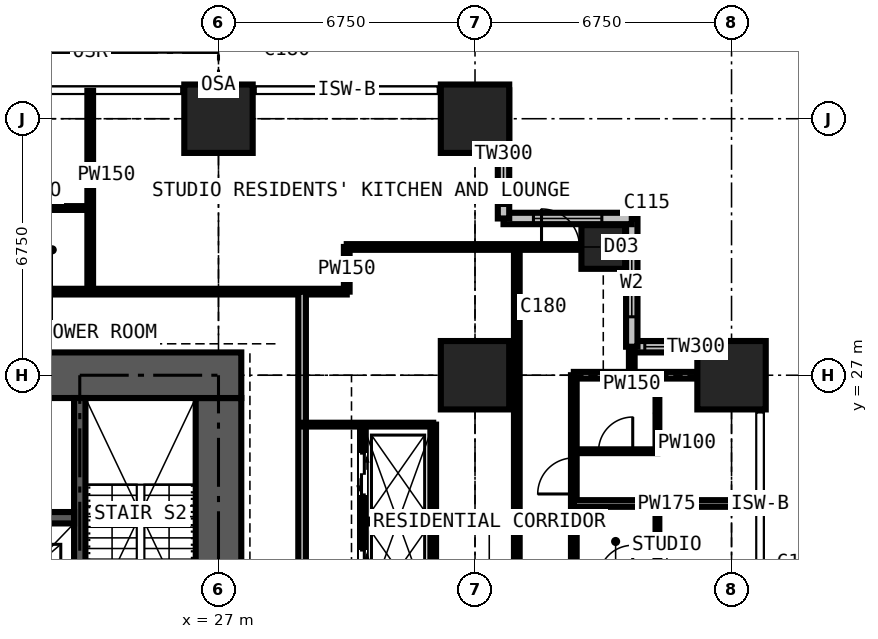
"""IFC4 building model, lengths in metres.
Left out: names, types, materials, properties, quantities, classifications, styles, units other than length and angle.
Written with IfcOpenShell. Run it as: python <this file> out.ifc"""

import sys

from ifc_helpers import new_model, si_unit, direction, frame, frame_2d, origin, origin_2d, place, context, subcontext, project, spatial, rectangle, extrude, element, fill, save


model = new_model("IFC4")
c1 = context("Model", 3, precision=1e-05, world=origin(), true_north=direction((0.0, 1.0)))
c2 = subcontext(c1, "Body", "Model", "MODEL_VIEW")
j1 = project(units=[si_unit("LENGTHUNIT", "METRE"), si_unit("PLANEANGLEUNIT", "RADIAN")], contexts=[c1])
p1 = place(None, origin())
s1 = spatial("IfcSite", under=j1, at=p1, CompositionType="ELEMENT")
p2 = place(p1, origin())
s2 = spatial("IfcBuilding", under=s1, at=p2, CompositionType="ELEMENT")
p3 = place(p2, frame((0.0, 0.0, 94.5)))
s3 = spatial("IfcBuildingStorey", under=s2, at=p3, CompositionType="ELEMENT", Elevation=94.5)
for number, where, z_axis, x_axis in (
    (1, (27.0, 33.75, 0.0), (0.0, 0.0, 1.0), (1.0, 0.0, 0.0)),
    (2, (33.75, 27.0, 0.0), (0.0, 0.0, 1.0), (1.0, 0.0, 0.0)),
    (3, (33.75, 33.75, 0.0), (0.0, 0.0, 1.0), (1.0, 0.0, 0.0)),
):
    element("IfcColumn", number, at=place(p3, frame(where, z_axis=z_axis, x_axis=x_axis)), inside=s3, PredefinedType="COLUMN", context=c2, shape_type="SweptSolid", body=[
        extrude(rectangle(XDim=1.8, YDim=1.8, at=origin_2d()), origin(), (0.0, 0.0, 1.0), 3.6),
    ])
p4 = place(p3, frame((37.125, 30.375, 0.0), z_axis=(0.0, 0.0, 1.0), x_axis=(1.0, 0.0, 0.0)))
e4 = element("IfcColumn", 4, at=p4, inside=s3, PredefinedType="COLUMN", context=c2, shape_type="SweptSolid", body=[
    extrude(rectangle(XDim=1.15, YDim=1.15, at=origin_2d()), origin(), (0.0, 0.0, 1.0), 3.6),
])
p5 = place(p3, frame((40.5, 27.0, 0.0), z_axis=(0.0, 0.0, 1.0), x_axis=(1.0, 0.0, 0.0)))
e5 = element("IfcColumn", 5, at=p5, inside=s3, PredefinedType="COLUMN", context=c2, shape_type="SweptSolid", body=[
    extrude(rectangle(XDim=1.8, YDim=1.8, at=origin_2d()), origin(), (0.0, 0.0, 1.0), 3.6),
])
p6 = place(p3, frame((27.0, 14.1, 0.0), z_axis=(0.0, 0.0, 1.0), x_axis=(0.0, 1.0, 0.0)))
e6 = element("IfcWall", 6, at=p6, inside=s3, PredefinedType="SHEAR", context=c2, shape_type="SweptSolid", body=[
    extrude(rectangle(XDim=12.3, YDim=1.2, at=frame_2d((6.15, 0.0))), origin(), (0.0, 0.0, 1.0), 3.6),
])
p7 = place(p6, frame((3.65, 0.0, 0.0)))
e7 = element("IfcOpeningElement", 7, at=p7, cuts=e6, PredefinedType="OPENING", context=c2, shape_type="SweptSolid", body=[
    extrude(rectangle(XDim=1.2, YDim=2.2, at=frame_2d((0.6, 1.1))), frame((0.0, 0.61, 0.0), z_axis=(0.0, -1.0, 0.0), x_axis=(1.0, 0.0, 0.0)), (0.0, 0.0, 1.0), 1.22),
])
p8 = place(p3, frame((27.6, 27.0, 0.0), z_axis=(0.0, 0.0, 1.0), x_axis=(-1.0, 0.0, 0.0)))
e8 = element("IfcWall", 8, at=p8, inside=s3, PredefinedType="SHEAR", context=c2, shape_type="SweptSolid", body=[
    extrude(rectangle(XDim=14.7, YDim=1.2, at=frame_2d((7.35, 0.0))), origin(), (0.0, 0.0, 1.0), 3.6),
])
p9 = place(p8, frame((5.225, 0.0, 0.0)))
e9 = element("IfcOpeningElement", 9, at=p9, cuts=e8, PredefinedType="OPENING", context=c2, shape_type="SweptSolid", body=[
    extrude(rectangle(XDim=0.9, YDim=2.2, at=frame_2d((0.45, 1.1))), frame((0.0, 0.61, 0.0), z_axis=(0.0, -1.0, 0.0), x_axis=(1.0, 0.0, 0.0)), (0.0, 0.0, 1.0), 1.22),
])
p10 = place(p8, frame((8.2, 0.0, 0.0)))
e10 = element("IfcOpeningElement", 10, at=p10, cuts=e8, PredefinedType="OPENING", context=c2, shape_type="SweptSolid", body=[
    extrude(rectangle(XDim=1.0, YDim=2.2, at=frame_2d((0.5, 1.1))), frame((0.0, 0.61, 0.0), z_axis=(0.0, -1.0, 0.0), x_axis=(1.0, 0.0, 0.0)), (0.0, 0.0, 1.0), 1.22),
])
p11 = place(p3, frame((41.25, 27.75, 0.0), z_axis=(0.0, 0.0, 1.0), x_axis=(-1.0, 0.0, 0.0)))
e11 = element("IfcWall", 11, at=p11, inside=s3, PredefinedType="SOLIDWALL", context=c2, shape_type="SweptSolid", body=[
    extrude(rectangle(XDim=3.375, YDim=0.3, at=frame_2d((1.688, 0.0))), origin(), (0.0, 0.0, 1.0), 3.375),
])
p12 = place(p11, frame((1.833, 0.0, 0.9)))
e12 = element("IfcOpeningElement", 12, at=p12, cuts=e11, PredefinedType="OPENING", context=c2, shape_type="SweptSolid", body=[
    extrude(rectangle(XDim=1.2, YDim=1.8, at=frame_2d((0.6, 0.9))), frame((0.0, 0.16, 0.0), z_axis=(0.0, -1.0, 0.0), x_axis=(1.0, 0.0, 0.0)), (0.0, 0.0, 1.0), 0.32),
])
p13 = place(p3, frame((37.875, 27.75, 0.0), z_axis=(0.0, 0.0, 1.0), x_axis=(0.0, 1.0, 0.0)))
e13 = element("IfcWall", 13, at=p13, inside=s3, PredefinedType="SOLIDWALL", context=c2, shape_type="SweptSolid", body=[
    extrude(rectangle(XDim=3.375, YDim=0.3, at=frame_2d((1.688, 0.0))), origin(), (0.0, 0.0, 1.0), 3.375),
])
p14 = place(p13, frame((0.788, 0.0, 0.6)))
e14 = element("IfcOpeningElement", 14, at=p14, cuts=e13, PredefinedType="OPENING", context=c2, shape_type="SweptSolid", body=[
    extrude(rectangle(XDim=1.8, YDim=2.1, at=frame_2d((0.9, 1.05))), frame((0.0, 0.16, 0.0), z_axis=(0.0, -1.0, 0.0), x_axis=(1.0, 0.0, 0.0)), (0.0, 0.0, 1.0), 0.32),
])
p15 = place(p3, frame((37.875, 31.125, 0.0), z_axis=(0.0, 0.0, 1.0), x_axis=(-1.0, 0.0, 0.0)))
e15 = element("IfcWall", 15, at=p15, inside=s3, PredefinedType="SOLIDWALL", context=c2, shape_type="SweptSolid", body=[
    extrude(rectangle(XDim=3.375, YDim=0.3, at=frame_2d((1.688, 0.0))), origin(), (0.0, 0.0, 1.0), 3.375),
])
p16 = place(p15, frame((0.788, 0.0, 0.6)))
e16 = element("IfcOpeningElement", 16, at=p16, cuts=e15, PredefinedType="OPENING", context=c2, shape_type="SweptSolid", body=[
    extrude(rectangle(XDim=1.8, YDim=2.1, at=frame_2d((0.9, 1.05))), frame((0.0, 0.16, 0.0), z_axis=(0.0, -1.0, 0.0), x_axis=(1.0, 0.0, 0.0)), (0.0, 0.0, 1.0), 0.32),
])
p17 = place(p3, frame((34.5, 31.125, 0.0), z_axis=(0.0, 0.0, 1.0), x_axis=(0.0, 1.0, 0.0)))
e17 = element("IfcWall", 17, at=p17, inside=s3, PredefinedType="SOLIDWALL", context=c2, shape_type="SweptSolid", body=[
    extrude(rectangle(XDim=3.375, YDim=0.3, at=frame_2d((1.688, 0.0))), origin(), (0.0, 0.0, 1.0), 3.375),
])
p18 = place(p17, frame((0.343, 0.0, 0.9)))
e18 = element("IfcOpeningElement", 18, at=p18, cuts=e17, PredefinedType="OPENING", context=c2, shape_type="SweptSolid", body=[
    extrude(rectangle(XDim=1.2, YDim=1.8, at=frame_2d((0.6, 0.9))), frame((0.0, 0.16, 0.0), z_axis=(0.0, -1.0, 0.0), x_axis=(1.0, 0.0, 0.0)), (0.0, 0.0, 1.0), 0.32),
])
p19 = place(p3, frame((23.35, 20.3, 0.0), z_axis=(0.0, 0.0, 1.0), x_axis=(0.0, 1.0, 0.0)))
e19 = element("IfcWall", 19, at=p19, inside=s3, PredefinedType="SHEAR", context=c2, shape_type="SweptSolid", body=[
    extrude(rectangle(XDim=6.1, YDim=0.3, at=frame_2d((3.05, 0.0))), origin(), (0.0, 0.0, 1.0), 3.6),
])
p20 = place(p3, frame((17.3, 23.25, 0.0), z_axis=(0.0, 0.0, 1.0), x_axis=(1.0, 0.0, 0.0)))
e20 = element("IfcWall", 20, at=p20, inside=s3, PredefinedType="SHEAR", context=c2, shape_type="SweptSolid", body=[
    extrude(rectangle(XDim=5.9, YDim=0.3, at=frame_2d((2.95, 0.0))), origin(), (0.0, 0.0, 1.0), 3.6),
])
p21 = place(p3, frame((11.3, 29.2, 0.0), z_axis=(0.0, 0.0, 1.0), x_axis=(1.0, 0.0, 0.0)))
e21 = element("IfcWall", 21, at=p21, inside=s3, PredefinedType="PARTITIONING", context=c2, shape_type="SweptSolid", body=[
    extrude(rectangle(XDim=19.075, YDim=0.15, at=frame_2d((9.538, 0.0))), origin(), (0.0, 0.0, 1.0), 3.375),
])
p22 = place(p21, frame((6.4, 0.0, 0.0)))
e22 = element("IfcOpeningElement", 22, at=p22, cuts=e21, PredefinedType="OPENING", context=c2, shape_type="SweptSolid", body=[
    extrude(rectangle(XDim=0.95, YDim=2.2, at=frame_2d((0.475, 1.1))), frame((0.0, 0.085, 0.0), z_axis=(0.0, -1.0, 0.0), x_axis=(1.0, 0.0, 0.0)), (0.0, 0.0, 1.0), 0.17),
])
p23 = place(p21, frame((9.2, 0.0, 0.0)))
e23 = element("IfcOpeningElement", 23, at=p23, cuts=e21, PredefinedType="OPENING", context=c2, shape_type="SweptSolid", body=[
    extrude(rectangle(XDim=0.95, YDim=2.2, at=frame_2d((0.475, 1.1))), frame((0.0, 0.085, 0.0), z_axis=(0.0, -1.0, 0.0), x_axis=(1.0, 0.0, 0.0)), (0.0, 0.0, 1.0), 0.17),
])
p24 = place(p21, frame((0.6, 0.0, 0.0)))
e24 = element("IfcOpeningElement", 24, at=p24, cuts=e21, PredefinedType="OPENING", context=c2, shape_type="SweptSolid", body=[
    extrude(rectangle(XDim=1.0, YDim=2.2, at=frame_2d((0.5, 1.1))), frame((0.0, 0.085, 0.0), z_axis=(0.0, -1.0, 0.0), x_axis=(1.0, 0.0, 0.0)), (0.0, 0.0, 1.0), 0.17),
])
p25 = place(p3, frame((21.625, 31.4, 0.0), z_axis=(0.0, 0.0, 1.0), x_axis=(1.0, 0.0, 0.0)))
e25 = element("IfcWall", 25, at=p25, inside=s3, PredefinedType="PARTITIONING", context=c2, shape_type="SweptSolid", body=[
    extrude(rectangle(XDim=2.0, YDim=0.1, at=frame_2d((1.0, 0.0))), origin(), (0.0, 0.0, 1.0), 3.375),
])
p26 = place(p3, frame((23.625, 29.2, 0.0), z_axis=(0.0, 0.0, 1.0), x_axis=(0.0, 1.0, 0.0)))
e26 = element("IfcWall", 26, at=p26, inside=s3, PredefinedType="PARTITIONING", context=c2, shape_type="SweptSolid", body=[
    extrude(rectangle(XDim=5.284, YDim=0.15, at=frame_2d((2.642, 0.0))), origin(), (0.0, 0.0, 1.0), 3.375),
])
p27 = place(p3, frame((29.2, 11.3, 0.0), z_axis=(0.0, 0.0, 1.0), x_axis=(0.0, 1.0, 0.0)))
e27 = element("IfcWall", 27, at=p27, inside=s3, PredefinedType="PARTITIONING", context=c2, shape_type="SweptSolid", body=[
    extrude(rectangle(XDim=17.9, YDim=0.2, at=frame_2d((8.95, 0.0))), origin(), (0.0, 0.0, 1.0), 3.375),
])
p28 = place(p27, frame((8.35, 0.0, 0.0)))
e28 = element("IfcOpeningElement", 28, at=p28, cuts=e27, PredefinedType="OPENING", context=c2, shape_type="SweptSolid", body=[
    extrude(rectangle(XDim=1.2, YDim=2.2, at=frame_2d((0.6, 1.1))), frame((0.0, 0.11, 0.0), z_axis=(0.0, -1.0, 0.0), x_axis=(1.0, 0.0, 0.0)), (0.0, 0.0, 1.0), 0.22),
])
p29 = place(p3, frame((29.2, 25.7, 0.0), z_axis=(0.0, 0.0, 1.0), x_axis=(1.0, 0.0, 0.0)))
e29 = element("IfcWall", 29, at=p29, inside=s3, PredefinedType="SHEAR", context=c2, shape_type="SweptSolid", body=[
    extrude(rectangle(XDim=3.45, YDim=0.1, at=frame_2d((1.725, 0.0))), origin(), (0.0, 0.0, 1.0), 3.375),
])
p30 = place(p3, frame((30.375, 29.2, 0.0), z_axis=(0.0, 0.0, 1.0), x_axis=(0.0, 1.0, 0.0)))
e30 = element("IfcWall", 30, at=p30, inside=s3, PredefinedType="PARTITIONING", context=c2, shape_type="SweptSolid", body=[
    extrude(rectangle(XDim=1.175, YDim=0.15, at=frame_2d((0.587, 0.0))), origin(), (0.0, 0.0, 1.0), 3.375),
])
p31 = place(p3, frame((30.375, 30.375, 0.0), z_axis=(0.0, 0.0, 1.0), x_axis=(1.0, 0.0, 0.0)))
e31 = element("IfcWall", 31, at=p31, inside=s3, PredefinedType="PARTITIONING", context=c2, shape_type="SweptSolid", body=[
    extrude(rectangle(XDim=7.35, YDim=0.15, at=frame_2d((3.675, 0.0))), origin(), (0.0, 0.0, 1.0), 2.877),
])
p32 = place(p31, frame((5.125, 0.0, 0.0)))
e32 = element("IfcOpeningElement", 32, at=p32, cuts=e31, PredefinedType="OPENING", context=c2, shape_type="SweptSolid", body=[
    extrude(rectangle(XDim=1.0, YDim=2.2, at=frame_2d((0.5, 1.1))), frame((0.0, 0.085, 0.0), z_axis=(0.0, -1.0, 0.0), x_axis=(1.0, 0.0, 0.0)), (0.0, 0.0, 1.0), 0.17),
])
p33 = place(p3, frame((30.8, 14.8, 0.0), z_axis=(0.0, 0.0, 1.0), x_axis=(0.0, 1.0, 0.0)))
e33 = element("IfcWall", 33, at=p33, inside=s3, PredefinedType="PARTITIONING", context=c2, shape_type="SweptSolid", body=[
    extrude(rectangle(XDim=10.9, YDim=0.15, at=frame_2d((5.45, 0.0))), origin(), (0.0, 0.0, 1.0), 3.375),
])
p34 = place(p33, frame((0.75, 0.0, 0.0)))
e34 = element("IfcOpeningElement", 34, at=p34, cuts=e33, PredefinedType="OPENING", context=c2, shape_type="SweptSolid", body=[
    extrude(rectangle(XDim=1.1, YDim=2.2, at=frame_2d((0.55, 1.1))), frame((0.0, 0.085, 0.0), z_axis=(0.0, -1.0, 0.0), x_axis=(1.0, 0.0, 0.0)), (0.0, 0.0, 1.0), 0.17),
])
p35 = place(p33, frame((3.25, 0.0, 0.0)))
e35 = element("IfcOpeningElement", 35, at=p35, cuts=e33, PredefinedType="OPENING", context=c2, shape_type="SweptSolid", body=[
    extrude(rectangle(XDim=1.1, YDim=2.2, at=frame_2d((0.55, 1.1))), frame((0.0, 0.085, 0.0), z_axis=(0.0, -1.0, 0.0), x_axis=(1.0, 0.0, 0.0)), (0.0, 0.0, 1.0), 0.17),
])
p36 = place(p33, frame((6.5, 0.0, 0.0)))
e36 = element("IfcOpeningElement", 36, at=p36, cuts=e33, PredefinedType="OPENING", context=c2, shape_type="SweptSolid", body=[
    extrude(rectangle(XDim=1.1, YDim=2.2, at=frame_2d((0.55, 1.1))), frame((0.0, 0.085, 0.0), z_axis=(0.0, -1.0, 0.0), x_axis=(1.0, 0.0, 0.0)), (0.0, 0.0, 1.0), 0.17),
])
p37 = place(p33, frame((9.05, 0.0, 0.0)))
e37 = element("IfcOpeningElement", 37, at=p37, cuts=e33, PredefinedType="OPENING", context=c2, shape_type="SweptSolid", body=[
    extrude(rectangle(XDim=1.1, YDim=2.2, at=frame_2d((0.55, 1.1))), frame((0.0, 0.085, 0.0), z_axis=(0.0, -1.0, 0.0), x_axis=(1.0, 0.0, 0.0)), (0.0, 0.0, 1.0), 0.17),
])
p38 = place(p3, frame((30.8, 23.15, 0.0), z_axis=(0.0, 0.0, 1.0), x_axis=(1.0, 0.0, 0.0)))
e38 = element("IfcWall", 38, at=p38, inside=s3, PredefinedType="SHEAR", context=c2, shape_type="SweptSolid", body=[
    extrude(rectangle(XDim=1.85, YDim=0.1, at=frame_2d((0.925, 0.0))), origin(), (0.0, 0.0, 1.0), 3.375),
])
p39 = place(p3, frame((32.65, 20.6, 0.0), z_axis=(0.0, 0.0, 1.0), x_axis=(0.0, 1.0, 0.0)))
e39 = element("IfcWall", 39, at=p39, inside=s3, PredefinedType="PARTITIONING", context=c2, shape_type="SweptSolid", body=[
    extrude(rectangle(XDim=5.1, YDim=0.15, at=frame_2d((2.55, 0.0))), origin(), (0.0, 0.0, 1.0), 3.375),
])
p40 = place(p3, frame((34.85, 12.55, 0.0), z_axis=(0.0, 0.0, 1.0), x_axis=(0.0, 1.0, 0.0)))
e40 = element("IfcWall", 40, at=p40, inside=s3, PredefinedType="PARTITIONING", context=c2, shape_type="SweptSolid", body=[
    extrude(rectangle(XDim=17.825, YDim=0.15, at=frame_2d((8.913, 0.0))), origin(), (0.0, 0.0, 1.0), 3.375),
])
p41 = place(p40, frame((8.6, 0.0, 0.0)))
e41 = element("IfcOpeningElement", 41, at=p41, cuts=e40, PredefinedType="OPENING", context=c2, shape_type="SweptSolid", body=[
    extrude(rectangle(XDim=0.95, YDim=2.2, at=frame_2d((0.475, 1.1))), frame((0.0, 0.085, 0.0), z_axis=(0.0, -1.0, 0.0), x_axis=(1.0, 0.0, 0.0)), (0.0, 0.0, 1.0), 0.17),
])
p42 = place(p3, frame((36.35, 6.75, 0.0), z_axis=(0.0, 0.0, 1.0), x_axis=(0.0, 1.0, 0.0)))
e42 = element("IfcWall", 42, at=p42, inside=s3, PredefinedType="PARTITIONING", context=c2, shape_type="SweptSolid", body=[
    extrude(rectangle(XDim=20.25, YDim=0.15, at=frame_2d((10.125, 0.0))), origin(), (0.0, 0.0, 1.0), 3.375),
])
p43 = place(p42, frame((0.2, 0.0, 0.0)))
e43 = element("IfcOpeningElement", 43, at=p43, cuts=e42, PredefinedType="OPENING", context=c2, shape_type="SweptSolid", body=[
    extrude(rectangle(XDim=0.95, YDim=2.2, at=frame_2d((0.475, 1.1))), frame((0.0, 0.085, 0.0), z_axis=(0.0, -1.0, 0.0), x_axis=(1.0, 0.0, 0.0)), (0.0, 0.0, 1.0), 0.17),
])
p44 = place(p42, frame((3.575, 0.0, 0.0)))
e44 = element("IfcOpeningElement", 44, at=p44, cuts=e42, PredefinedType="OPENING", context=c2, shape_type="SweptSolid", body=[
    extrude(rectangle(XDim=0.95, YDim=2.2, at=frame_2d((0.475, 1.1))), frame((0.0, 0.085, 0.0), z_axis=(0.0, -1.0, 0.0), x_axis=(1.0, 0.0, 0.0)), (0.0, 0.0, 1.0), 0.17),
])
p45 = place(p42, frame((7.0, 0.0, 0.0)))
e45 = element("IfcOpeningElement", 45, at=p45, cuts=e42, PredefinedType="OPENING", context=c2, shape_type="SweptSolid", body=[
    extrude(rectangle(XDim=0.95, YDim=2.2, at=frame_2d((0.475, 1.1))), frame((0.0, 0.085, 0.0), z_axis=(0.0, -1.0, 0.0), x_axis=(1.0, 0.0, 0.0)), (0.0, 0.0, 1.0), 0.17),
])
p46 = place(p42, frame((10.375, 0.0, 0.0)))
e46 = element("IfcOpeningElement", 46, at=p46, cuts=e42, PredefinedType="OPENING", context=c2, shape_type="SweptSolid", body=[
    extrude(rectangle(XDim=0.95, YDim=2.2, at=frame_2d((0.475, 1.1))), frame((0.0, 0.085, 0.0), z_axis=(0.0, -1.0, 0.0), x_axis=(1.0, 0.0, 0.0)), (0.0, 0.0, 1.0), 0.17),
])
p47 = place(p42, frame((13.75, 0.0, 0.0)))
e47 = element("IfcOpeningElement", 47, at=p47, cuts=e42, PredefinedType="OPENING", context=c2, shape_type="SweptSolid", body=[
    extrude(rectangle(XDim=0.95, YDim=2.2, at=frame_2d((0.475, 1.1))), frame((0.0, 0.085, 0.0), z_axis=(0.0, -1.0, 0.0), x_axis=(1.0, 0.0, 0.0)), (0.0, 0.0, 1.0), 0.17),
])
p48 = place(p42, frame((17.125, 0.0, 0.0)))
e48 = element("IfcOpeningElement", 48, at=p48, cuts=e42, PredefinedType="OPENING", context=c2, shape_type="SweptSolid", body=[
    extrude(rectangle(XDim=0.95, YDim=2.2, at=frame_2d((0.475, 1.1))), frame((0.0, 0.085, 0.0), z_axis=(0.0, -1.0, 0.0), x_axis=(1.0, 0.0, 0.0)), (0.0, 0.0, 1.0), 0.17),
])
p49 = place(p3, frame((36.35, 23.625, 0.0), z_axis=(0.0, 0.0, 1.0), x_axis=(1.0, 0.0, 0.0)))
e49 = element("IfcWall", 49, at=p49, inside=s3, PredefinedType="PARTITIONING", context=c2, shape_type="SweptSolid", body=[
    extrude(rectangle(XDim=4.884, YDim=0.175, at=frame_2d((2.442, 0.0))), origin(), (0.0, 0.0, 1.0), 3.375),
])
p50 = place(p3, frame((36.35, 25.0, 0.0), z_axis=(0.0, 0.0, 1.0), x_axis=(1.0, 0.0, 0.0)))
e50 = element("IfcWall", 50, at=p50, inside=s3, PredefinedType="PARTITIONING", context=c2, shape_type="SweptSolid", body=[
    extrude(rectangle(XDim=2.2, YDim=0.1, at=frame_2d((1.1, 0.0))), origin(), (0.0, 0.0, 1.0), 3.375),
])
p51 = place(p50, frame((0.65, 0.0, 0.0)))
e51 = element("IfcOpeningElement", 51, at=p51, cuts=e50, PredefinedType="OPENING", context=c2, shape_type="SweptSolid", body=[
    extrude(rectangle(XDim=0.9, YDim=2.2, at=frame_2d((0.45, 1.1))), frame((0.0, 0.06, 0.0), z_axis=(0.0, -1.0, 0.0), x_axis=(1.0, 0.0, 0.0)), (0.0, 0.0, 1.0), 0.12),
])
p52 = place(p3, frame((36.35, 27.0, 0.0), z_axis=(0.0, 0.0, 1.0), x_axis=(1.0, 0.0, 0.0)))
e52 = element("IfcWall", 52, at=p52, inside=s3, PredefinedType="PARTITIONING", context=c2, shape_type="SweptSolid", body=[
    extrude(rectangle(XDim=4.884, YDim=0.175, at=frame_2d((2.442, 0.0))), origin(), (0.0, 0.0, 1.0), 2.877),
])
p53 = place(p3, frame((37.875, 27.0, 0.0), z_axis=(0.0, 0.0, 1.0), x_axis=(0.0, 1.0, 0.0)))
e53 = element("IfcWall", 53, at=p53, inside=s3, PredefinedType="PARTITIONING", context=c2, shape_type="SweptSolid", body=[
    extrude(rectangle(XDim=0.734, YDim=0.15, at=frame_2d((0.367, 0.0))), origin(), (0.0, 0.0, 1.0), 3.375),
])
for number, where, z_axis, x_axis in (
    (54, (38.55, 21.625, 0.0), (0.0, 0.0, 1.0), (0.0, 1.0, 0.0)),
    (55, (38.55, 25.0, 0.0), (0.0, 0.0, 1.0), (0.0, 1.0, 0.0)),
):
    element("IfcWall", number, at=place(p3, frame(where, z_axis=z_axis, x_axis=x_axis)), inside=s3, PredefinedType="PARTITIONING", context=c2, shape_type="SweptSolid", body=[
        extrude(rectangle(XDim=2.0, YDim=0.1, at=frame_2d((1.0, 0.0))), origin(), (0.0, 0.0, 1.0), 3.375),
    ])
p54 = place(p12, origin())
e56 = element("IfcWindow", 56, at=p54, inside=s3, PartitioningType="SINGLE_PANEL", PredefinedType="WINDOW", context=c2, shape_type="SweptSolid", body=[
    extrude(rectangle(XDim=1.2, YDim=1.8, at=frame_2d((0.6, 0.9))), frame((0.0, 0.03, 0.0), z_axis=(0.0, -1.0, 0.0), x_axis=(1.0, 0.0, 0.0)), (0.0, 0.0, 1.0), 0.06),
])
fill(e12, e56)
p55 = place(p14, origin())
e57 = element("IfcWindow", 57, at=p55, inside=s3, PartitioningType="SINGLE_PANEL", PredefinedType="WINDOW", context=c2, shape_type="SweptSolid", body=[
    extrude(rectangle(XDim=1.8, YDim=2.1, at=frame_2d((0.9, 1.05))), frame((0.0, 0.03, 0.0), z_axis=(0.0, -1.0, 0.0), x_axis=(1.0, 0.0, 0.0)), (0.0, 0.0, 1.0), 0.06),
])
fill(e14, e57)
p56 = place(p16, origin())
e58 = element("IfcWindow", 58, at=p56, inside=s3, PartitioningType="SINGLE_PANEL", PredefinedType="WINDOW", context=c2, shape_type="SweptSolid", body=[
    extrude(rectangle(XDim=1.8, YDim=2.1, at=frame_2d((0.9, 1.05))), frame((0.0, 0.03, 0.0), z_axis=(0.0, -1.0, 0.0), x_axis=(1.0, 0.0, 0.0)), (0.0, 0.0, 1.0), 0.06),
])
fill(e16, e58)
p57 = place(p18, origin())
e59 = element("IfcWindow", 59, at=p57, inside=s3, PartitioningType="SINGLE_PANEL", PredefinedType="WINDOW", context=c2, shape_type="SweptSolid", body=[
    extrude(rectangle(XDim=1.2, YDim=1.8, at=frame_2d((0.6, 0.9))), frame((0.0, 0.03, 0.0), z_axis=(0.0, -1.0, 0.0), x_axis=(1.0, 0.0, 0.0)), (0.0, 0.0, 1.0), 0.06),
])
fill(e18, e59)
p58 = place(p48, origin())
e60 = element("IfcDoor", 60, at=p58, inside=s3, OperationType="SINGLE_SWING_LEFT", PredefinedType="DOOR", context=c2, shape_type="SweptSolid", body=[
    extrude(rectangle(XDim=0.95, YDim=2.2, at=frame_2d((0.475, 1.1))), frame((0.0, 0.025, 0.0), z_axis=(0.0, -1.0, 0.0), x_axis=(1.0, 0.0, 0.0)), (0.0, 0.0, 1.0), 0.05),
])
fill(e48, e60)
p59 = place(p51, origin())
e61 = element("IfcDoor", 61, at=p59, inside=s3, OperationType="SINGLE_SWING_RIGHT", PredefinedType="DOOR", context=c2, shape_type="SweptSolid", body=[
    extrude(rectangle(XDim=0.9, YDim=2.2, at=frame_2d((0.45, 1.1))), frame((0.0, 0.025, 0.0), z_axis=(0.0, -1.0, 0.0), x_axis=(1.0, 0.0, 0.0)), (0.0, 0.0, 1.0), 0.05),
])
fill(e51, e61)
p60 = place(p32, origin())
e62 = element("IfcDoor", 62, at=p60, inside=s3, OperationType="SINGLE_SWING_LEFT", PredefinedType="DOOR", context=c2, shape_type="SweptSolid", body=[
    extrude(rectangle(XDim=1.0, YDim=2.2, at=frame_2d((0.5, 1.1))), frame((0.0, 0.025, 0.0), z_axis=(0.0, -1.0, 0.0), x_axis=(1.0, 0.0, 0.0)), (0.0, 0.0, 1.0), 0.05),
])
fill(e32, e62)
p61 = place(p36, origin())
e63 = element("IfcDoor", 63, at=p61, inside=s3, OperationType="DOUBLE_DOOR_SLIDING", PredefinedType="DOOR", context=c2, shape_type="SweptSolid", body=[
    extrude(rectangle(XDim=1.1, YDim=2.2, at=frame_2d((0.55, 1.1))), frame((0.0, 0.025, 0.0), z_axis=(0.0, -1.0, 0.0), x_axis=(1.0, 0.0, 0.0)), (0.0, 0.0, 1.0), 0.05),
])
fill(e36, e63)
p62 = place(p37, origin())
e64 = element("IfcDoor", 64, at=p62, inside=s3, OperationType="DOUBLE_DOOR_SLIDING", PredefinedType="DOOR", context=c2, shape_type="SweptSolid", body=[
    extrude(rectangle(XDim=1.1, YDim=2.2, at=frame_2d((0.55, 1.1))), frame((0.0, 0.025, 0.0), z_axis=(0.0, -1.0, 0.0), x_axis=(1.0, 0.0, 0.0)), (0.0, 0.0, 1.0), 0.05),
])
fill(e37, e64)
save(model, sys.argv[1])
